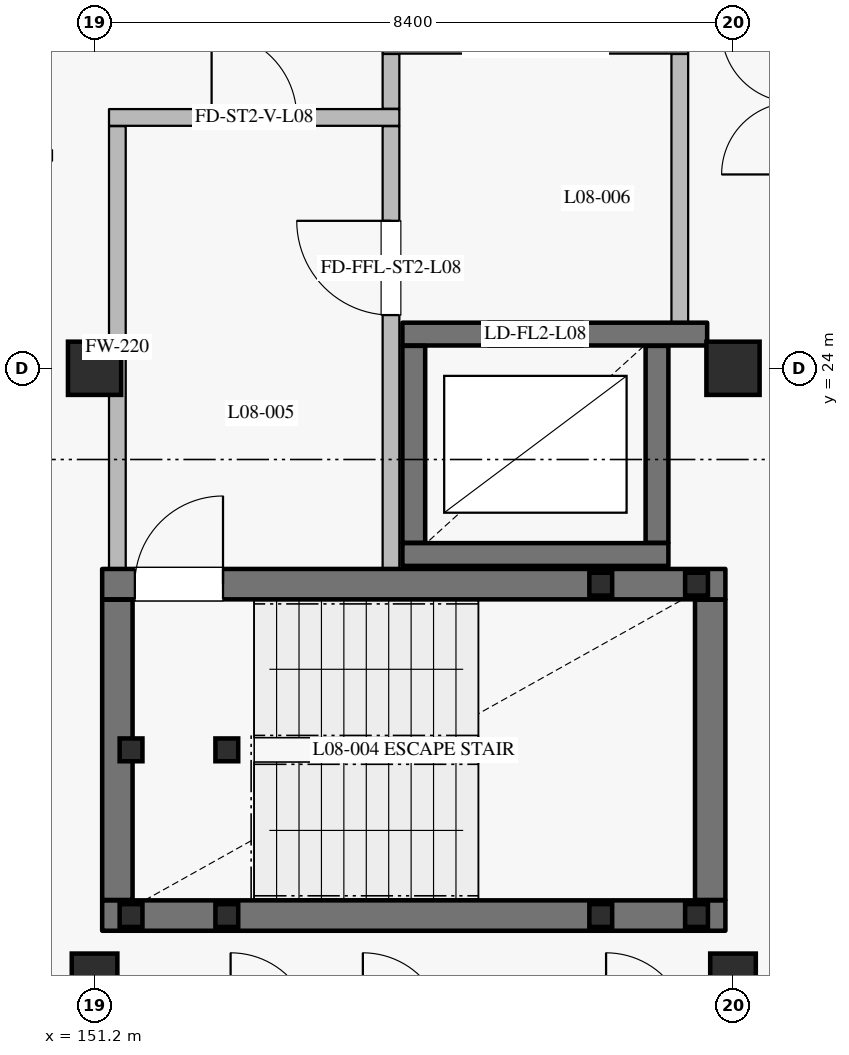
"""IFC4 building model, lengths in metres.
Left out: names, types, materials, properties, quantities, classifications, styles, units other than length and angle.
Written with IfcOpenShell. Run it as: python <this file> out.ifc"""

import sys

from ifc_helpers import new_model, si_unit, direction, frame, frame_2d, origin, origin_2d, place, context, subcontext, project, spatial, rectangle, hollow_rectangle, extrude, element, fill, save


model = new_model("IFC4")
c1 = context("Model", 3, precision=1e-05, world=origin(), true_north=direction((0.0, 1.0)))
c2 = subcontext(c1, "Body", "Model", "MODEL_VIEW")
j1 = project(units=[si_unit("LENGTHUNIT", "METRE"), si_unit("PLANEANGLEUNIT", "RADIAN")], contexts=[c1])
p1 = place(None, origin())
s1 = spatial("IfcSite", under=j1, at=p1, CompositionType="ELEMENT")
p2 = place(p1, origin())
s2 = spatial("IfcBuilding", under=s1, at=p2, CompositionType="ELEMENT")
p3 = place(p2, frame((0.0, 0.0, 36.0)))
s3 = spatial("IfcBuildingStorey", under=s2, at=p3, CompositionType="ELEMENT", Elevation=36.0)
for number, where, z_axis, x_axis in (
    (1, (151.2, 24.0, 0.0), (0.0, 0.0, 1.0), (1.0, 0.0, 0.0)),
    (2, (159.6, 24.0, 0.0), (0.0, 0.0, 1.0), (1.0, 0.0, 0.0)),
):
    element("IfcColumn", number, at=place(p3, frame(where, z_axis=z_axis, x_axis=x_axis)), inside=s3, PredefinedType="COLUMN", context=c2, shape_type="SweptSolid", body=[
        extrude(rectangle(XDim=0.7, YDim=0.7, at=origin_2d()), origin(), (0.0, 0.0, 1.0), 3.6),
    ])
for number, where, z_axis, x_axis in (
    (3, (151.2, 16.0, 0.0), (0.0, 0.0, 1.0), (1.0, 0.0, 0.0)),
    (4, (159.6, 16.0, 0.0), (0.0, 0.0, 1.0), (1.0, 0.0, 0.0)),
):
    element("IfcColumn", number, at=place(p3, frame(where, z_axis=z_axis, x_axis=x_axis)), inside=s3, PredefinedType="COLUMN", context=c2, shape_type="SweptSolid", body=[
        extrude(rectangle(XDim=0.6, YDim=0.6, at=origin_2d()), origin(), (0.0, 0.0, 1.0), 3.6),
    ])
p4 = place(p3, frame((155.25, 21.55, 0.0), z_axis=(0.0, 0.0, 1.0), x_axis=(1.0, 0.0, 0.0)))
e5 = element("IfcWall", 5, at=p4, inside=s3, PredefinedType="SHEAR", context=c2, shape_type="SweptSolid", body=[
    extrude(rectangle(XDim=3.5, YDim=0.3, at=frame_2d((1.75, 0.0))), origin(), (0.0, 0.0, 1.0), 3.365),
])
p5 = place(p3, frame((158.6, 21.705, 0.0), z_axis=(0.0, 0.0, 1.0), x_axis=(0.0, 1.0, 0.0)))
e6 = element("IfcWall", 6, at=p5, inside=s3, PredefinedType="SHEAR", context=c2, shape_type="SweptSolid", body=[
    extrude(rectangle(XDim=2.59, YDim=0.3, at=frame_2d((1.295, 0.0))), origin(), (0.0, 0.0, 1.0), 3.365),
])
p6 = place(p3, frame((159.26, 24.45, 0.0), z_axis=(0.0, 0.0, 1.0), x_axis=(-1.0, 0.0, 0.0)))
e7 = element("IfcWall", 7, at=p6, inside=s3, PredefinedType="SHEAR", context=c2, shape_type="SweptSolid", body=[
    extrude(rectangle(XDim=4.01, YDim=0.3, at=frame_2d((2.005, 0.0))), origin(), (0.0, 0.0, 1.0), 3.365),
])
p7 = place(p6, frame((1.635, 0.0, 0.0)))
e8 = element("IfcOpeningElement", 8, at=p7, cuts=e7, PredefinedType="OPENING", context=c2, shape_type="SweptSolid", body=[
    extrude(rectangle(XDim=1.25, YDim=2.25, at=frame_2d((0.625, 1.125))), frame((0.0, 0.16, 0.0), z_axis=(0.0, -1.0, 0.0), x_axis=(1.0, 0.0, 0.0)), (0.0, 0.0, 1.0), 0.32),
])
p8 = place(p3, frame((155.4, 24.295, 0.0), z_axis=(0.0, 0.0, 1.0), x_axis=(0.0, -1.0, 0.0)))
e9 = element("IfcWall", 9, at=p8, inside=s3, PredefinedType="SHEAR", context=c2, shape_type="SweptSolid", body=[
    extrude(rectangle(XDim=2.59, YDim=0.3, at=frame_2d((1.295, 0.0))), origin(), (0.0, 0.0, 1.0), 3.365),
])
p9 = place(p3, frame((151.3, 16.8, 0.0), z_axis=(0.0, 0.0, 1.0), x_axis=(1.0, 0.0, 0.0)))
e10 = element("IfcWall", 10, at=p9, inside=s3, PredefinedType="SHEAR", context=c2, shape_type="SweptSolid", body=[
    extrude(rectangle(XDim=8.2, YDim=0.4, at=frame_2d((4.1, 0.0))), origin(), (0.0, 0.0, 1.0), 3.365),
])
p10 = place(p3, frame((159.3, 17.005, 0.0), z_axis=(0.0, 0.0, 1.0), x_axis=(0.0, 1.0, 0.0)))
e11 = element("IfcWall", 11, at=p10, inside=s3, PredefinedType="SHEAR", context=c2, shape_type="SweptSolid", body=[
    extrude(rectangle(XDim=3.95, YDim=0.4, at=frame_2d((1.975, 0.0))), origin(), (0.0, 0.0, 1.0), 3.365),
])
p11 = place(p3, frame((151.3, 21.16, 0.0), z_axis=(0.0, 0.0, 1.0), x_axis=(1.0, 0.0, 0.0)))
e12 = element("IfcWall", 12, at=p11, inside=s3, PredefinedType="SHEAR", context=c2, shape_type="SweptSolid", body=[
    extrude(rectangle(XDim=8.2, YDim=0.4, at=frame_2d((4.1, 0.0))), origin(), (0.0, 0.0, 1.0), 3.365),
])
p12 = place(p11, frame((0.43, 0.0, 0.0)))
e13 = element("IfcOpeningElement", 13, at=p12, cuts=e12, PredefinedType="OPENING", context=c2, shape_type="SweptSolid", body=[
    extrude(rectangle(XDim=1.16, YDim=2.2, at=frame_2d((0.58, 1.1))), frame((0.0, 0.21, 0.0), z_axis=(0.0, -1.0, 0.0), x_axis=(1.0, 0.0, 0.0)), (0.0, 0.0, 1.0), 0.42),
])
p13 = place(p3, frame((151.5, 17.005, 0.0), z_axis=(0.0, 0.0, 1.0), x_axis=(0.0, 1.0, 0.0)))
e14 = element("IfcWall", 14, at=p13, inside=s3, PredefinedType="SHEAR", context=c2, shape_type="SweptSolid", body=[
    extrude(rectangle(XDim=3.95, YDim=0.4, at=frame_2d((1.975, 0.0))), origin(), (0.0, 0.0, 1.0), 3.365),
])
p14 = place(p3, frame((151.5, 21.365, 0.0), z_axis=(0.0, 0.0, 1.0), x_axis=(0.0, 1.0, 0.0)))
e15 = element("IfcWall", 15, at=p14, inside=s3, PredefinedType="PARTITIONING", context=c2, shape_type="SweptSolid", body=[
    extrude(rectangle(XDim=5.82, YDim=0.22, at=frame_2d((2.91, 0.0))), origin(), (0.0, 0.0, 1.0), 3.365),
])
p15 = place(p3, frame((151.39, 27.3, 0.0), z_axis=(0.0, 0.0, 1.0), x_axis=(1.0, 0.0, 0.0)))
e16 = element("IfcWall", 16, at=p15, inside=s3, PredefinedType="PARTITIONING", context=c2, shape_type="SweptSolid", body=[
    extrude(rectangle(XDim=3.82, YDim=0.22, at=frame_2d((1.91, 0.0))), origin(), (0.0, 0.0, 1.0), 3.365),
])
p16 = place(p15, frame((1.35, 0.0, 0.0)))
e17 = element("IfcOpeningElement", 17, at=p16, cuts=e16, PredefinedType="OPENING", context=c2, shape_type="SweptSolid", body=[
    extrude(rectangle(XDim=1.12, YDim=2.2, at=frame_2d((0.56, 1.1))), frame((0.0, 0.12, 0.0), z_axis=(0.0, -1.0, 0.0), x_axis=(1.0, 0.0, 0.0)), (0.0, 0.0, 1.0), 0.24),
])
p17 = place(p3, frame((155.1, 21.365, 0.0), z_axis=(0.0, 0.0, 1.0), x_axis=(0.0, 1.0, 0.0)))
e18 = element("IfcWall", 18, at=p17, inside=s3, PredefinedType="PARTITIONING", context=c2, shape_type="SweptSolid", body=[
    extrude(rectangle(XDim=5.82, YDim=0.22, at=frame_2d((2.91, 0.0))), origin(), (0.0, 0.0, 1.0), 3.365),
])
p18 = place(p17, frame((3.335, 0.0, 0.0)))
e19 = element("IfcOpeningElement", 19, at=p18, cuts=e18, PredefinedType="OPENING", context=c2, shape_type="SweptSolid", body=[
    extrude(rectangle(XDim=1.24, YDim=2.2, at=frame_2d((0.62, 1.1))), frame((0.0, 0.12, 0.0), z_axis=(0.0, -1.0, 0.0), x_axis=(1.0, 0.0, 0.0)), (0.0, 0.0, 1.0), 0.24),
])
p19 = place(p3, frame((155.1, 27.415, 0.0), z_axis=(0.0, 0.0, 1.0), x_axis=(0.0, 1.0, 0.0)))
e20 = element("IfcWall", 20, at=p19, inside=s3, PredefinedType="PARTITIONING", context=c2, shape_type="SweptSolid", body=[
    extrude(rectangle(XDim=0.72, YDim=0.22, at=frame_2d((0.36, 0.0))), origin(), (0.0, 0.0, 1.0), 3.365),
])
p20 = place(p3, frame((158.9, 24.605, 0.0), z_axis=(0.0, 0.0, 1.0), x_axis=(0.0, 1.0, 0.0)))
e21 = element("IfcWall", 21, at=p20, inside=s3, PredefinedType="PARTITIONING", context=c2, shape_type="SweptSolid", body=[
    extrude(rectangle(XDim=3.53, YDim=0.22, at=frame_2d((1.765, 0.0))), origin(), (0.0, 0.0, 1.0), 3.365),
])
p21 = place(p3, frame((154.99, 28.25, 0.0), z_axis=(0.0, 0.0, 1.0), x_axis=(1.0, 0.0, 0.0)))
e22 = element("IfcWall", 22, at=p21, inside=s3, PredefinedType="PARTITIONING", context=c2, shape_type="SweptSolid", body=[
    extrude(rectangle(XDim=4.02, YDim=0.22, at=frame_2d((2.01, 0.0))), origin(), (0.0, 0.0, 1.0), 3.365),
])
p22 = place(p21, frame((1.39, 0.0, 0.0)))
e23 = element("IfcOpeningElement", 23, at=p22, cuts=e22, PredefinedType="OPENING", context=c2, shape_type="SweptSolid", body=[
    extrude(rectangle(XDim=1.24, YDim=2.2, at=frame_2d((0.62, 1.1))), frame((0.0, 0.12, 0.0), z_axis=(0.0, -1.0, 0.0), x_axis=(1.0, 0.0, 0.0)), (0.0, 0.0, 1.0), 0.24),
])
for number, where, z_axis, x_axis in (
    (24, (151.68, 16.8, 0.0), (0.0, 0.0, 1.0), (1.0, 0.0, 0.0)),
    (25, (151.68, 18.98, 0.0), (0.0, 0.0, 1.0), (1.0, 0.0, 0.0)),
    (26, (152.94, 16.8, 0.0), (0.0, 0.0, 1.0), (1.0, 0.0, 0.0)),
    (27, (152.94, 18.98, 0.0), (0.0, 0.0, 1.0), (1.0, 0.0, 0.0)),
):
    element("IfcColumn", number, at=place(p3, frame(where, z_axis=z_axis, x_axis=x_axis)), inside=s3, PredefinedType="COLUMN", context=c2, shape_type="SweptSolid", body=[
        extrude(hollow_rectangle(XDim=0.3, YDim=0.3, WallThickness=0.012, at=origin_2d()), origin(), (0.0, 0.0, 1.0), 3.42),
    ])
for number, where, z_axis, x_axis in (
    (28, (157.86, 16.8, -1.8), (0.0, 0.0, 1.0), (1.0, 0.0, 0.0)),
    (29, (157.86, 21.16, -1.8), (0.0, 0.0, 1.0), (1.0, 0.0, 0.0)),
    (30, (159.12, 16.8, -1.8), (0.0, 0.0, 1.0), (1.0, 0.0, 0.0)),
    (31, (159.12, 21.16, -1.8), (0.0, 0.0, 1.0), (1.0, 0.0, 0.0)),
):
    element("IfcColumn", number, at=place(p3, frame(where, z_axis=z_axis, x_axis=x_axis)), inside=s3, PredefinedType="COLUMN", context=c2, shape_type="SweptSolid", body=[
        extrude(hollow_rectangle(XDim=0.3, YDim=0.3, WallThickness=0.012, at=origin_2d()), origin(), (0.0, 0.0, 1.0), 3.42),
    ])
p23 = place(p7, origin())
e32 = element("IfcDoor", 32, at=p23, inside=s3, OperationType="DOUBLE_DOOR_SLIDING", PredefinedType="DOOR", context=c2, shape_type="SweptSolid", body=[
    extrude(rectangle(XDim=1.25, YDim=2.25, at=frame_2d((0.625, 1.125))), frame((0.0, 0.025, 0.0), z_axis=(0.0, -1.0, 0.0), x_axis=(1.0, 0.0, 0.0)), (0.0, 0.0, 1.0), 0.05),
])
fill(e8, e32)
p24 = place(p12, origin())
e33 = element("IfcDoor", 33, at=p24, inside=s3, OperationType="SINGLE_SWING_RIGHT", PredefinedType="DOOR", context=c2, shape_type="SweptSolid", body=[
    extrude(rectangle(XDim=1.16, YDim=2.2, at=frame_2d((0.58, 1.1))), frame((0.0, 0.025, 0.0), z_axis=(0.0, -1.0, 0.0), x_axis=(1.0, 0.0, 0.0)), (0.0, 0.0, 1.0), 0.05),
])
fill(e13, e33)
p25 = place(p16, origin())
e34 = element("IfcDoor", 34, at=p25, inside=s3, OperationType="SINGLE_SWING_LEFT", PredefinedType="DOOR", context=c2, shape_type="SweptSolid", body=[
    extrude(rectangle(XDim=1.12, YDim=2.2, at=frame_2d((0.56, 1.1))), frame((0.0, 0.025, 0.0), z_axis=(0.0, -1.0, 0.0), x_axis=(1.0, 0.0, 0.0)), (0.0, 0.0, 1.0), 0.05),
])
fill(e17, e34)
p26 = place(p18, origin())
e35 = element("IfcDoor", 35, at=p26, inside=s3, OperationType="SINGLE_SWING_RIGHT", PredefinedType="DOOR", context=c2, shape_type="SweptSolid", body=[
    extrude(rectangle(XDim=1.24, YDim=2.2, at=frame_2d((0.62, 1.1))), frame((0.0, 0.025, 0.0), z_axis=(0.0, -1.0, 0.0), x_axis=(1.0, 0.0, 0.0)), (0.0, 0.0, 1.0), 0.05),
])
fill(e19, e35)
save(model, sys.argv[1])
